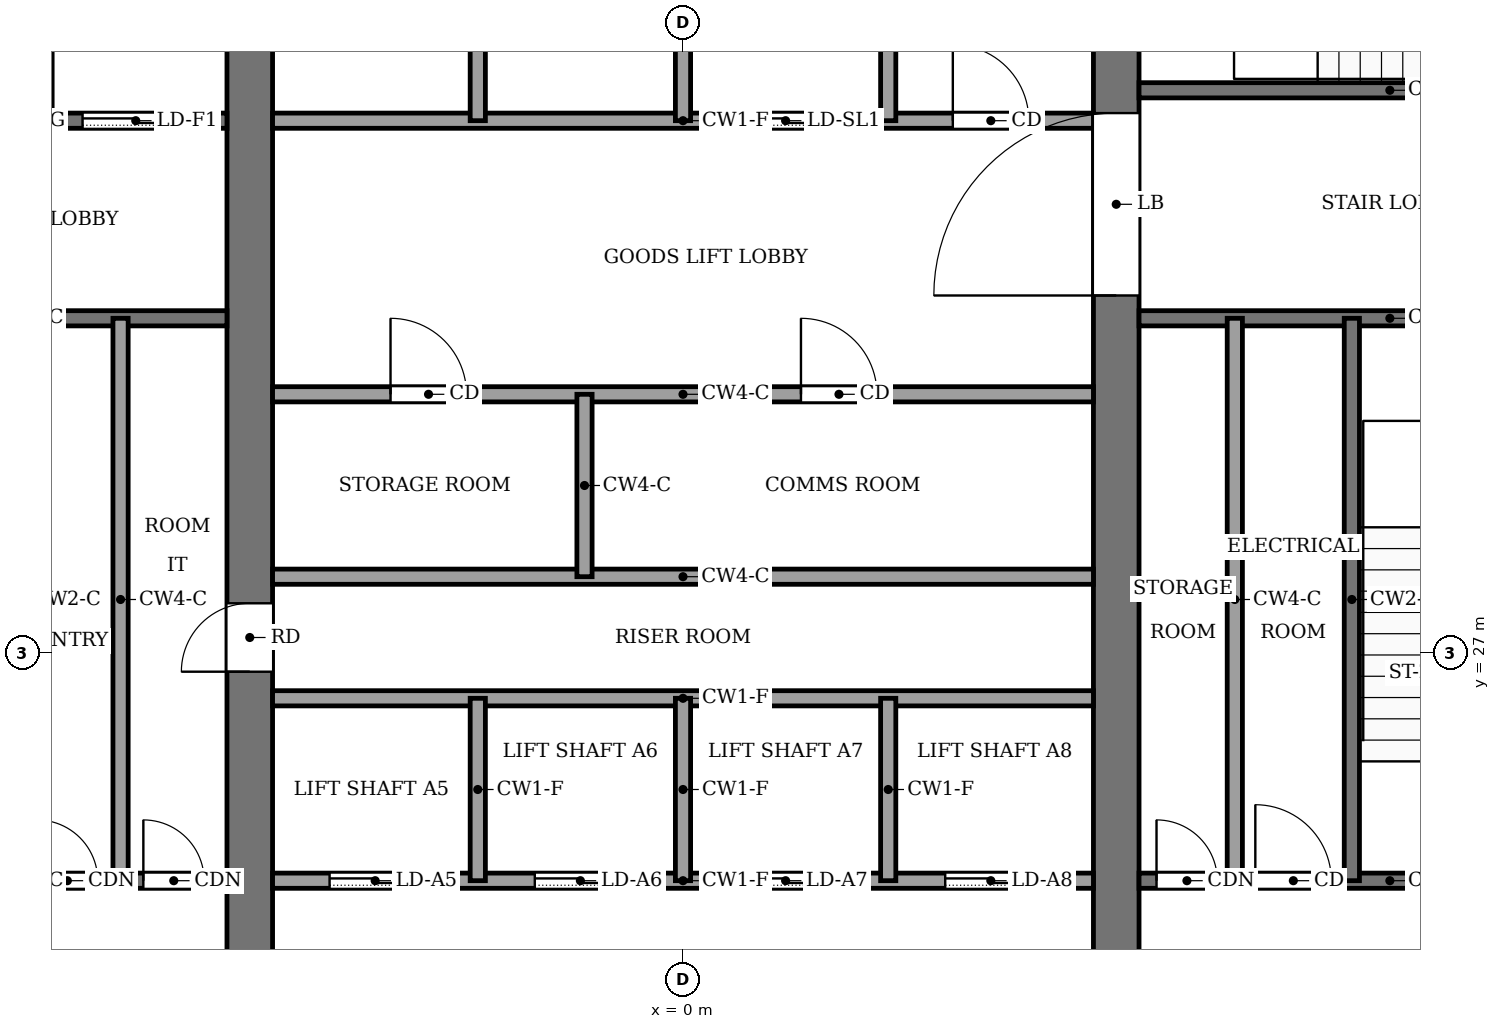
"""IFC4 building model, lengths in metres.
Left out: names, types, materials, properties, quantities, classifications, styles, units other than length and angle.
Written with IfcOpenShell. Run it as: python <this file> out.ifc"""

import sys

from ifc_helpers import new_model, si_unit, direction, frame, frame_2d, origin, place, context, subcontext, project, spatial, rectangle, extrude, element, fill, save


model = new_model("IFC4")
c1 = context("Model", 3, precision=1e-05, world=origin(), true_north=direction((0.0, 1.0)))
c2 = subcontext(c1, "Body", "Model", "MODEL_VIEW")
j1 = project(units=[si_unit("LENGTHUNIT", "METRE"), si_unit("PLANEANGLEUNIT", "RADIAN")], contexts=[c1])
p1 = place(None, origin())
s1 = spatial("IfcSite", under=j1, at=p1, CompositionType="ELEMENT")
p2 = place(p1, origin())
s2 = spatial("IfcBuilding", under=s1, at=p2, CompositionType="ELEMENT")
p3 = place(p2, frame((0.0, 0.0, 250.0)))
s3 = spatial("IfcBuildingStorey", under=s2, at=p3, CompositionType="ELEMENT", Elevation=250.0)
p4 = place(p3, frame((-5.7, 18.4, -0.13), z_axis=(0.0, 0.0, 1.0), x_axis=(0.0, 1.0, 0.0)))
e1 = element("IfcWall", 1, at=p4, inside=s3, PredefinedType="SHEAR", context=c2, shape_type="SweptSolid", body=[
    extrude(rectangle(XDim=19.2, YDim=0.6, at=frame_2d((9.6, 0.0))), origin(), (0.0, 0.0, 1.0), 4.0),
])
p5 = place(p4, frame((8.35, 0.0, 0.13)))
e2 = element("IfcOpeningElement", 2, at=p5, cuts=e1, PredefinedType="OPENING", context=c2, shape_type="SweptSolid", body=[
    extrude(rectangle(XDim=0.9, YDim=2.1, at=frame_2d((0.45, 1.05))), frame((0.0, 0.31, 0.0), z_axis=(0.0, -1.0, 0.0), x_axis=(1.0, 0.0, 0.0)), (0.0, 0.0, 1.0), 0.62),
])
p6 = place(p3, frame((5.7, 18.4, -0.13), z_axis=(0.0, 0.0, 1.0), x_axis=(0.0, 1.0, 0.0)))
e3 = element("IfcWall", 3, at=p6, inside=s3, PredefinedType="SHEAR", context=c2, shape_type="SweptSolid", body=[
    extrude(rectangle(XDim=19.2, YDim=0.6, at=frame_2d((9.6, 0.0))), origin(), (0.0, 0.0, 1.0), 4.0),
])
p7 = place(p6, frame((13.3, 0.0, 0.13)))
e4 = element("IfcOpeningElement", 4, at=p7, cuts=e3, PredefinedType="OPENING", context=c2, shape_type="SweptSolid", body=[
    extrude(rectangle(XDim=2.4, YDim=2.4, at=frame_2d((1.2, 1.2))), frame((0.0, 0.31, 0.0), z_axis=(0.0, -1.0, 0.0), x_axis=(1.0, 0.0, 0.0)), (0.0, 0.0, 1.0), 0.62),
])
p8 = place(p3, frame((-12.6, 24.0, 0.0), z_axis=(0.0, 0.0, 1.0), x_axis=(1.0, 0.0, 0.0)))
e5 = element("IfcWall", 5, at=p8, inside=s3, PredefinedType="PARTITIONING", context=c2, shape_type="SweptSolid", body=[
    extrude(rectangle(XDim=6.6, YDim=0.2, at=frame_2d((3.3, 0.0))), origin(), (0.0, 0.0, 1.0), 3.87),
])
p9 = place(p8, frame((4.1, 0.0, 0.0)))
e6 = element("IfcOpeningElement", 6, at=p9, cuts=e5, PredefinedType="OPENING", context=c2, shape_type="SweptSolid", body=[
    extrude(rectangle(XDim=0.8, YDim=2.1, at=frame_2d((0.4, 1.05))), frame((0.0, 0.11, 0.0), z_axis=(0.0, -1.0, 0.0), x_axis=(1.0, 0.0, 0.0)), (0.0, 0.0, 1.0), 0.22),
])
p10 = place(p8, frame((5.5, 0.0, 0.0)))
e7 = element("IfcOpeningElement", 7, at=p10, cuts=e5, PredefinedType="OPENING", context=c2, shape_type="SweptSolid", body=[
    extrude(rectangle(XDim=0.8, YDim=2.1, at=frame_2d((0.4, 1.05))), frame((0.0, 0.11, 0.0), z_axis=(0.0, -1.0, 0.0), x_axis=(1.0, 0.0, 0.0)), (0.0, 0.0, 1.0), 0.22),
])
p11 = place(p3, frame((-5.4, 24.0, 0.0), z_axis=(0.0, 0.0, 1.0), x_axis=(1.0, 0.0, 0.0)))
e8 = element("IfcWall", 8, at=p11, inside=s3, PredefinedType="PARTITIONING", context=c2, shape_type="SweptSolid", body=[
    extrude(rectangle(XDim=10.8, YDim=0.2, at=frame_2d((5.4, 0.0))), origin(), (0.0, 0.0, 1.0), 3.87),
])
p12 = place(p11, frame((0.75, 0.0, 0.0)))
e9 = element("IfcOpeningElement", 9, at=p12, cuts=e8, PredefinedType="OPENING", context=c2, shape_type="SweptSolid", body=[
    extrude(rectangle(XDim=1.2, YDim=2.2, at=frame_2d((0.6, 1.1))), frame((0.0, 0.11, 0.0), z_axis=(0.0, -1.0, 0.0), x_axis=(1.0, 0.0, 0.0)), (0.0, 0.0, 1.0), 0.22),
])
p13 = place(p11, frame((3.45, 0.0, 0.0)))
e10 = element("IfcOpeningElement", 10, at=p13, cuts=e8, PredefinedType="OPENING", context=c2, shape_type="SweptSolid", body=[
    extrude(rectangle(XDim=1.2, YDim=2.2, at=frame_2d((0.6, 1.1))), frame((0.0, 0.11, 0.0), z_axis=(0.0, -1.0, 0.0), x_axis=(1.0, 0.0, 0.0)), (0.0, 0.0, 1.0), 0.22),
])
p14 = place(p11, frame((6.15, 0.0, 0.0)))
e11 = element("IfcOpeningElement", 11, at=p14, cuts=e8, PredefinedType="OPENING", context=c2, shape_type="SweptSolid", body=[
    extrude(rectangle(XDim=1.2, YDim=2.2, at=frame_2d((0.6, 1.1))), frame((0.0, 0.11, 0.0), z_axis=(0.0, -1.0, 0.0), x_axis=(1.0, 0.0, 0.0)), (0.0, 0.0, 1.0), 0.22),
])
p15 = place(p11, frame((8.85, 0.0, 0.0)))
e12 = element("IfcOpeningElement", 12, at=p15, cuts=e8, PredefinedType="OPENING", context=c2, shape_type="SweptSolid", body=[
    extrude(rectangle(XDim=1.2, YDim=2.2, at=frame_2d((0.6, 1.1))), frame((0.0, 0.11, 0.0), z_axis=(0.0, -1.0, 0.0), x_axis=(1.0, 0.0, 0.0)), (0.0, 0.0, 1.0), 0.22),
])
p16 = place(p3, frame((6.0, 24.0, 0.0), z_axis=(0.0, 0.0, 1.0), x_axis=(1.0, 0.0, 0.0)))
e13 = element("IfcWall", 13, at=p16, inside=s3, PredefinedType="PARTITIONING", context=c2, shape_type="SweptSolid", body=[
    extrude(rectangle(XDim=6.6, YDim=0.2, at=frame_2d((3.3, 0.0))), origin(), (0.0, 0.0, 1.0), 3.87),
])
p17 = place(p16, frame((0.23, 0.0, 0.0)))
e14 = element("IfcOpeningElement", 14, at=p17, cuts=e13, PredefinedType="OPENING", context=c2, shape_type="SweptSolid", body=[
    extrude(rectangle(XDim=0.8, YDim=2.1, at=frame_2d((0.4, 1.05))), frame((0.0, 0.11, 0.0), z_axis=(0.0, -1.0, 0.0), x_axis=(1.0, 0.0, 0.0)), (0.0, 0.0, 1.0), 0.22),
])
p18 = place(p16, frame((1.53, 0.0, 0.0)))
e15 = element("IfcOpeningElement", 15, at=p18, cuts=e13, PredefinedType="OPENING", context=c2, shape_type="SweptSolid", body=[
    extrude(rectangle(XDim=1.0, YDim=2.1, at=frame_2d((0.5, 1.05))), frame((0.0, 0.11, 0.0), z_axis=(0.0, -1.0, 0.0), x_axis=(1.0, 0.0, 0.0)), (0.0, 0.0, 1.0), 0.22),
])
p19 = place(p16, frame((4.4, 0.0, 0.0)))
e16 = element("IfcOpeningElement", 16, at=p19, cuts=e13, PredefinedType="OPENING", context=c2, shape_type="SweptSolid", body=[
    extrude(rectangle(XDim=1.2, YDim=2.2, at=frame_2d((0.6, 1.1))), frame((0.0, 0.11, 0.0), z_axis=(0.0, -1.0, 0.0), x_axis=(1.0, 0.0, 0.0)), (0.0, 0.0, 1.0), 0.22),
])
for number, where, z_axis, x_axis in (
    (17, (-5.4, 26.4, 0.0), (0.0, 0.0, 1.0), (1.0, 0.0, 0.0)),
    (18, (-5.4, 28.0, 0.0), (0.0, 0.0, 1.0), (1.0, 0.0, 0.0)),
):
    element("IfcWall", number, at=place(p3, frame(where, z_axis=z_axis, x_axis=x_axis)), inside=s3, PredefinedType="PARTITIONING", context=c2, shape_type="SweptSolid", body=[
        extrude(rectangle(XDim=10.8, YDim=0.2, at=frame_2d((5.4, 0.0))), origin(), (0.0, 0.0, 1.0), 3.87),
    ])
p20 = place(p3, frame((-5.4, 30.4, 0.0), z_axis=(0.0, 0.0, 1.0), x_axis=(1.0, 0.0, 0.0)))
e19 = element("IfcWall", 19, at=p20, inside=s3, PredefinedType="PARTITIONING", context=c2, shape_type="SweptSolid", body=[
    extrude(rectangle(XDim=10.8, YDim=0.2, at=frame_2d((5.4, 0.0))), origin(), (0.0, 0.0, 1.0), 3.87),
])
p21 = place(p20, frame((1.552, 0.0, 0.0)))
e20 = element("IfcOpeningElement", 20, at=p21, cuts=e19, PredefinedType="OPENING", context=c2, shape_type="SweptSolid", body=[
    extrude(rectangle(XDim=1.0, YDim=2.1, at=frame_2d((0.5, 1.05))), frame((0.0, 0.11, 0.0), z_axis=(0.0, -1.0, 0.0), x_axis=(1.0, 0.0, 0.0)), (0.0, 0.0, 1.0), 0.22),
])
p22 = place(p20, frame((6.952, 0.0, 0.0)))
e21 = element("IfcOpeningElement", 21, at=p22, cuts=e19, PredefinedType="OPENING", context=c2, shape_type="SweptSolid", body=[
    extrude(rectangle(XDim=1.0, YDim=2.1, at=frame_2d((0.5, 1.05))), frame((0.0, 0.11, 0.0), z_axis=(0.0, -1.0, 0.0), x_axis=(1.0, 0.0, 0.0)), (0.0, 0.0, 1.0), 0.22),
])
p23 = place(p3, frame((-12.6, 31.4, 0.0), z_axis=(0.0, 0.0, 1.0), x_axis=(1.0, 0.0, 0.0)))
e22 = element("IfcWall", 22, at=p23, inside=s3, PredefinedType="PARTITIONING", context=c2, shape_type="SweptSolid", body=[
    extrude(rectangle(XDim=6.6, YDim=0.2, at=frame_2d((3.3, 0.0))), origin(), (0.0, 0.0, 1.0), 3.87),
])
p24 = place(p23, frame((1.0, 0.0, 0.0)))
e23 = element("IfcOpeningElement", 23, at=p24, cuts=e22, PredefinedType="OPENING", context=c2, shape_type="SweptSolid", body=[
    extrude(rectangle(XDim=1.2, YDim=2.2, at=frame_2d((0.6, 1.1))), frame((0.0, 0.11, 0.0), z_axis=(0.0, -1.0, 0.0), x_axis=(1.0, 0.0, 0.0)), (0.0, 0.0, 1.0), 0.22),
])
p25 = place(p3, frame((6.0, 31.4, 0.0), z_axis=(0.0, 0.0, 1.0), x_axis=(1.0, 0.0, 0.0)))
e24 = element("IfcWall", 24, at=p25, inside=s3, PredefinedType="PARTITIONING", context=c2, shape_type="SweptSolid", body=[
    extrude(rectangle(XDim=6.6, YDim=0.2, at=frame_2d((3.3, 0.0))), origin(), (0.0, 0.0, 1.0), 3.87),
])
p26 = place(p3, frame((-12.6, 34.0, 0.0), z_axis=(0.0, 0.0, 1.0), x_axis=(1.0, 0.0, 0.0)))
e25 = element("IfcWall", 25, at=p26, inside=s3, PredefinedType="PARTITIONING", context=c2, shape_type="SweptSolid", body=[
    extrude(rectangle(XDim=6.6, YDim=0.2, at=frame_2d((3.3, 0.0))), origin(), (0.0, 0.0, 1.0), 3.87),
])
p27 = place(p26, frame((4.7, 0.0, 0.0)))
e26 = element("IfcOpeningElement", 26, at=p27, cuts=e25, PredefinedType="OPENING", context=c2, shape_type="SweptSolid", body=[
    extrude(rectangle(XDim=1.4, YDim=2.2, at=frame_2d((0.7, 1.1))), frame((0.0, 0.11, 0.0), z_axis=(0.0, -1.0, 0.0), x_axis=(1.0, 0.0, 0.0)), (0.0, 0.0, 1.0), 0.22),
])
p28 = place(p26, frame((2.3, 0.0, 0.0)))
e27 = element("IfcOpeningElement", 27, at=p28, cuts=e25, PredefinedType="OPENING", context=c2, shape_type="SweptSolid", body=[
    extrude(rectangle(XDim=1.4, YDim=2.2, at=frame_2d((0.7, 1.1))), frame((0.0, 0.11, 0.0), z_axis=(0.0, -1.0, 0.0), x_axis=(1.0, 0.0, 0.0)), (0.0, 0.0, 1.0), 0.22),
])
p29 = place(p26, frame((0.45, 0.0, 0.0)))
e28 = element("IfcOpeningElement", 28, at=p29, cuts=e25, PredefinedType="OPENING", context=c2, shape_type="SweptSolid", body=[
    extrude(rectangle(XDim=0.9, YDim=2.1, at=frame_2d((0.45, 1.05))), frame((0.0, 0.11, 0.0), z_axis=(0.0, -1.0, 0.0), x_axis=(1.0, 0.0, 0.0)), (0.0, 0.0, 1.0), 0.22),
])
p30 = place(p3, frame((-5.4, 34.0, 0.0), z_axis=(0.0, 0.0, 1.0), x_axis=(1.0, 0.0, 0.0)))
e29 = element("IfcWall", 29, at=p30, inside=s3, PredefinedType="PARTITIONING", context=c2, shape_type="SweptSolid", body=[
    extrude(rectangle(XDim=10.8, YDim=0.2, at=frame_2d((5.4, 0.0))), origin(), (0.0, 0.0, 1.0), 3.87),
])
p31 = place(p30, frame((6.15, 0.0, 0.0)))
e30 = element("IfcOpeningElement", 30, at=p31, cuts=e29, PredefinedType="OPENING", context=c2, shape_type="SweptSolid", body=[
    extrude(rectangle(XDim=1.2, YDim=2.2, at=frame_2d((0.6, 1.1))), frame((0.0, 0.11, 0.0), z_axis=(0.0, -1.0, 0.0), x_axis=(1.0, 0.0, 0.0)), (0.0, 0.0, 1.0), 0.22),
])
p32 = place(p30, frame((8.95, 0.0, 0.0)))
e31 = element("IfcOpeningElement", 31, at=p32, cuts=e29, PredefinedType="OPENING", context=c2, shape_type="SweptSolid", body=[
    extrude(rectangle(XDim=1.0, YDim=2.1, at=frame_2d((0.5, 1.05))), frame((0.0, 0.11, 0.0), z_axis=(0.0, -1.0, 0.0), x_axis=(1.0, 0.0, 0.0)), (0.0, 0.0, 1.0), 0.22),
])
p33 = place(p3, frame((6.0, 34.4, 0.0), z_axis=(0.0, 0.0, 1.0), x_axis=(1.0, 0.0, 0.0)))
e32 = element("IfcWall", 32, at=p33, inside=s3, PredefinedType="PARTITIONING", context=c2, shape_type="SweptSolid", body=[
    extrude(rectangle(XDim=6.6, YDim=0.2, at=frame_2d((3.3, 0.0))), origin(), (0.0, 0.0, 1.0), 3.87),
])
p34 = place(p33, frame((4.8, 0.0, 0.0)))
e33 = element("IfcOpeningElement", 33, at=p34, cuts=e32, PredefinedType="OPENING", context=c2, shape_type="SweptSolid", body=[
    extrude(rectangle(XDim=1.2, YDim=2.2, at=frame_2d((0.6, 1.1))), frame((0.0, 0.11, 0.0), z_axis=(0.0, -1.0, 0.0), x_axis=(1.0, 0.0, 0.0)), (0.0, 0.0, 1.0), 0.22),
])
p35 = place(p3, frame((-8.4, 34.0, 0.0), z_axis=(0.0, 0.0, 1.0), x_axis=(0.0, 1.0, 0.0)))
e34 = element("IfcWall", 34, at=p35, inside=s3, PredefinedType="PARTITIONING", context=c2, shape_type="SweptSolid", body=[
    extrude(rectangle(XDim=3.6, YDim=0.2, at=frame_2d((1.8, 0.0))), origin(), (0.0, 0.0, 1.0), 3.87),
])
p36 = place(p3, frame((-7.4, 24.0, 0.0), z_axis=(0.0, 0.0, 1.0), x_axis=(0.0, 1.0, 0.0)))
e35 = element("IfcWall", 35, at=p36, inside=s3, PredefinedType="PARTITIONING", context=c2, shape_type="SweptSolid", body=[
    extrude(rectangle(XDim=7.4, YDim=0.2, at=frame_2d((3.7, 0.0))), origin(), (0.0, 0.0, 1.0), 3.87),
])
p37 = place(p3, frame((-2.7, 24.0, 0.0), z_axis=(0.0, 0.0, 1.0), x_axis=(0.0, 1.0, 0.0)))
e36 = element("IfcWall", 36, at=p37, inside=s3, PredefinedType="PARTITIONING", context=c2, shape_type="SweptSolid", body=[
    extrude(rectangle(XDim=2.4, YDim=0.2, at=frame_2d((1.2, 0.0))), origin(), (0.0, 0.0, 1.0), 3.87),
])
p38 = place(p3, frame((-2.7, 34.0, 0.0), z_axis=(0.0, 0.0, 1.0), x_axis=(0.0, 1.0, 0.0)))
e37 = element("IfcWall", 37, at=p38, inside=s3, PredefinedType="PARTITIONING", context=c2, shape_type="SweptSolid", body=[
    extrude(rectangle(XDim=3.6, YDim=0.2, at=frame_2d((1.8, 0.0))), origin(), (0.0, 0.0, 1.0), 3.87),
])
for number, where, z_axis, x_axis in (
    (38, (-1.296, 28.0, 0.0), (0.0, 0.0, 1.0), (0.0, 1.0, 0.0)),
    (39, (0.0, 24.0, 0.0), (0.0, 0.0, 1.0), (0.0, 1.0, 0.0)),
):
    element("IfcWall", number, at=place(p3, frame(where, z_axis=z_axis, x_axis=x_axis)), inside=s3, PredefinedType="PARTITIONING", context=c2, shape_type="SweptSolid", body=[
        extrude(rectangle(XDim=2.4, YDim=0.2, at=frame_2d((1.2, 0.0))), origin(), (0.0, 0.0, 1.0), 3.87),
    ])
p39 = place(p3, frame((0.0, 34.0, 0.0), z_axis=(0.0, 0.0, 1.0), x_axis=(0.0, 1.0, 0.0)))
e40 = element("IfcWall", 40, at=p39, inside=s3, PredefinedType="PARTITIONING", context=c2, shape_type="SweptSolid", body=[
    extrude(rectangle(XDim=3.6, YDim=0.2, at=frame_2d((1.8, 0.0))), origin(), (0.0, 0.0, 1.0), 3.87),
])
p40 = place(p3, frame((2.7, 24.0, 0.0), z_axis=(0.0, 0.0, 1.0), x_axis=(0.0, 1.0, 0.0)))
e41 = element("IfcWall", 41, at=p40, inside=s3, PredefinedType="PARTITIONING", context=c2, shape_type="SweptSolid", body=[
    extrude(rectangle(XDim=2.4, YDim=0.2, at=frame_2d((1.2, 0.0))), origin(), (0.0, 0.0, 1.0), 3.87),
])
p41 = place(p3, frame((2.7, 34.0, 0.0), z_axis=(0.0, 0.0, 1.0), x_axis=(0.0, 1.0, 0.0)))
e42 = element("IfcWall", 42, at=p41, inside=s3, PredefinedType="PARTITIONING", context=c2, shape_type="SweptSolid", body=[
    extrude(rectangle(XDim=3.6, YDim=0.2, at=frame_2d((1.8, 0.0))), origin(), (0.0, 0.0, 1.0), 3.87),
])
for number, where, z_axis, x_axis in (
    (43, (7.26, 24.0, 0.0), (0.0, 0.0, 1.0), (0.0, 1.0, 0.0)),
    (44, (8.8, 24.0, 0.0), (0.0, 0.0, 1.0), (0.0, 1.0, 0.0)),
):
    element("IfcWall", number, at=place(p3, frame(where, z_axis=z_axis, x_axis=x_axis)), inside=s3, PredefinedType="PARTITIONING", context=c2, shape_type="SweptSolid", body=[
        extrude(rectangle(XDim=7.4, YDim=0.2, at=frame_2d((3.7, 0.0))), origin(), (0.0, 0.0, 1.0), 3.87),
    ])
p42 = place(p12, origin())
e45 = element("IfcDoor", 45, at=p42, inside=s3, OperationType="SLIDING_TO_LEFT", PredefinedType="DOOR", context=c2, shape_type="SweptSolid", body=[
    extrude(rectangle(XDim=1.2, YDim=2.2, at=frame_2d((0.6, 1.1))), frame((0.0, 0.025, 0.0), z_axis=(0.0, -1.0, 0.0), x_axis=(1.0, 0.0, 0.0)), (0.0, 0.0, 1.0), 0.05),
])
fill(e9, e45)
p43 = place(p13, origin())
e46 = element("IfcDoor", 46, at=p43, inside=s3, OperationType="SLIDING_TO_LEFT", PredefinedType="DOOR", context=c2, shape_type="SweptSolid", body=[
    extrude(rectangle(XDim=1.2, YDim=2.2, at=frame_2d((0.6, 1.1))), frame((0.0, 0.025, 0.0), z_axis=(0.0, -1.0, 0.0), x_axis=(1.0, 0.0, 0.0)), (0.0, 0.0, 1.0), 0.05),
])
fill(e10, e46)
p44 = place(p14, origin())
e47 = element("IfcDoor", 47, at=p44, inside=s3, OperationType="SLIDING_TO_LEFT", PredefinedType="DOOR", context=c2, shape_type="SweptSolid", body=[
    extrude(rectangle(XDim=1.2, YDim=2.2, at=frame_2d((0.6, 1.1))), frame((0.0, 0.025, 0.0), z_axis=(0.0, -1.0, 0.0), x_axis=(1.0, 0.0, 0.0)), (0.0, 0.0, 1.0), 0.05),
])
fill(e11, e47)
p45 = place(p15, origin())
e48 = element("IfcDoor", 48, at=p45, inside=s3, OperationType="SLIDING_TO_LEFT", PredefinedType="DOOR", context=c2, shape_type="SweptSolid", body=[
    extrude(rectangle(XDim=1.2, YDim=2.2, at=frame_2d((0.6, 1.1))), frame((0.0, 0.025, 0.0), z_axis=(0.0, -1.0, 0.0), x_axis=(1.0, 0.0, 0.0)), (0.0, 0.0, 1.0), 0.05),
])
fill(e12, e48)
p46 = place(p31, origin())
e49 = element("IfcDoor", 49, at=p46, inside=s3, OperationType="SLIDING_TO_LEFT", PredefinedType="DOOR", context=c2, shape_type="SweptSolid", body=[
    extrude(rectangle(XDim=1.2, YDim=2.2, at=frame_2d((0.6, 1.1))), frame((0.0, 0.025, 0.0), z_axis=(0.0, -1.0, 0.0), x_axis=(1.0, 0.0, 0.0)), (0.0, 0.0, 1.0), 0.05),
])
fill(e30, e49)
p47 = place(p27, origin())
e50 = element("IfcDoor", 50, at=p47, inside=s3, OperationType="SLIDING_TO_LEFT", PredefinedType="DOOR", context=c2, shape_type="SweptSolid", body=[
    extrude(rectangle(XDim=1.4, YDim=2.2, at=frame_2d((0.7, 1.1))), frame((0.0, 0.025, 0.0), z_axis=(0.0, -1.0, 0.0), x_axis=(1.0, 0.0, 0.0)), (0.0, 0.0, 1.0), 0.05),
])
fill(e26, e50)
p48 = place(p21, origin())
e51 = element("IfcDoor", 51, at=p48, inside=s3, OperationType="SINGLE_SWING_LEFT", PredefinedType="DOOR", context=c2, shape_type="SweptSolid", body=[
    extrude(rectangle(XDim=1.0, YDim=2.1, at=frame_2d((0.5, 1.05))), frame((0.0, 0.025, 0.0), z_axis=(0.0, -1.0, 0.0), x_axis=(1.0, 0.0, 0.0)), (0.0, 0.0, 1.0), 0.05),
])
fill(e20, e51)
p49 = place(p22, origin())
e52 = element("IfcDoor", 52, at=p49, inside=s3, OperationType="SINGLE_SWING_RIGHT", PredefinedType="DOOR", context=c2, shape_type="SweptSolid", body=[
    extrude(rectangle(XDim=1.0, YDim=2.1, at=frame_2d((0.5, 1.05))), frame((0.0, 0.025, 0.0), z_axis=(0.0, -1.0, 0.0), x_axis=(1.0, 0.0, 0.0)), (0.0, 0.0, 1.0), 0.05),
])
fill(e21, e52)
p50 = place(p9, origin())
e53 = element("IfcDoor", 53, at=p50, inside=s3, OperationType="SINGLE_SWING_LEFT", PredefinedType="DOOR", context=c2, shape_type="SweptSolid", body=[
    extrude(rectangle(XDim=0.8, YDim=2.1, at=frame_2d((0.4, 1.05))), frame((0.0, 0.025, 0.0), z_axis=(0.0, -1.0, 0.0), x_axis=(1.0, 0.0, 0.0)), (0.0, 0.0, 1.0), 0.05),
])
fill(e6, e53)
p51 = place(p10, origin())
e54 = element("IfcDoor", 54, at=p51, inside=s3, OperationType="SINGLE_SWING_RIGHT", PredefinedType="DOOR", context=c2, shape_type="SweptSolid", body=[
    extrude(rectangle(XDim=0.8, YDim=2.1, at=frame_2d((0.4, 1.05))), frame((0.0, 0.025, 0.0), z_axis=(0.0, -1.0, 0.0), x_axis=(1.0, 0.0, 0.0)), (0.0, 0.0, 1.0), 0.05),
])
fill(e7, e54)
p52 = place(p17, origin())
e55 = element("IfcDoor", 55, at=p52, inside=s3, OperationType="SINGLE_SWING_RIGHT", PredefinedType="DOOR", context=c2, shape_type="SweptSolid", body=[
    extrude(rectangle(XDim=0.8, YDim=2.1, at=frame_2d((0.4, 1.05))), frame((0.0, 0.025, 0.0), z_axis=(0.0, -1.0, 0.0), x_axis=(1.0, 0.0, 0.0)), (0.0, 0.0, 1.0), 0.05),
])
fill(e14, e55)
p53 = place(p18, origin())
e56 = element("IfcDoor", 56, at=p53, inside=s3, OperationType="SINGLE_SWING_LEFT", PredefinedType="DOOR", context=c2, shape_type="SweptSolid", body=[
    extrude(rectangle(XDim=1.0, YDim=2.1, at=frame_2d((0.5, 1.05))), frame((0.0, 0.025, 0.0), z_axis=(0.0, -1.0, 0.0), x_axis=(1.0, 0.0, 0.0)), (0.0, 0.0, 1.0), 0.05),
])
fill(e15, e56)
p54 = place(p32, origin())
e57 = element("IfcDoor", 57, at=p54, inside=s3, OperationType="SINGLE_SWING_LEFT", PredefinedType="DOOR", context=c2, shape_type="SweptSolid", body=[
    extrude(rectangle(XDim=1.0, YDim=2.1, at=frame_2d((0.5, 1.05))), frame((0.0, 0.025, 0.0), z_axis=(0.0, -1.0, 0.0), x_axis=(1.0, 0.0, 0.0)), (0.0, 0.0, 1.0), 0.05),
])
fill(e31, e57)
p55 = place(p5, origin())
e58 = element("IfcDoor", 58, at=p55, inside=s3, OperationType="SINGLE_SWING_RIGHT", PredefinedType="DOOR", context=c2, shape_type="SweptSolid", body=[
    extrude(rectangle(XDim=0.9, YDim=2.1, at=frame_2d((0.45, 1.05))), frame((0.0, 0.025, 0.0), z_axis=(0.0, -1.0, 0.0), x_axis=(1.0, 0.0, 0.0)), (0.0, 0.0, 1.0), 0.05),
])
fill(e2, e58)
p56 = place(p7, origin())
e59 = element("IfcDoor", 59, at=p56, inside=s3, OperationType="DOUBLE_DOOR_SINGLE_SWING", PredefinedType="DOOR", context=c2, shape_type="SweptSolid", body=[
    extrude(rectangle(XDim=2.4, YDim=2.4, at=frame_2d((1.2, 1.2))), frame((0.0, 0.025, 0.0), z_axis=(0.0, -1.0, 0.0), x_axis=(1.0, 0.0, 0.0)), (0.0, 0.0, 1.0), 0.05),
])
fill(e4, e59)
save(model, sys.argv[1])
